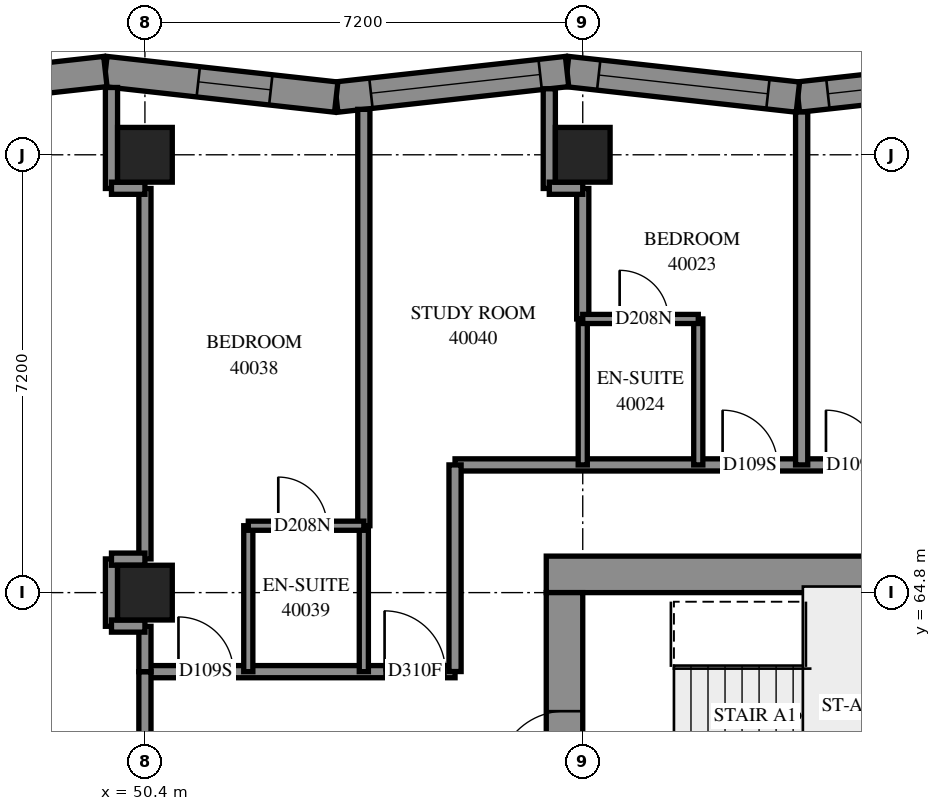
"""IFC4 building model, lengths in metres.
Left out: names, types, materials, properties, quantities, classifications, styles, units other than length and angle.
Written with IfcOpenShell. Run it as: python <this file> out.ifc"""

import sys

from ifc_helpers import new_model, si_unit, direction, frame, frame_2d, origin, origin_2d, place, context, subcontext, project, spatial, polyline, rectangle, outline, extrude, element, fill, save


model = new_model("IFC4")
c1 = context("Model", 3, precision=1e-05, world=origin(), true_north=direction((0.0, 1.0)))
c2 = subcontext(c1, "Body", "Model", "MODEL_VIEW")
j1 = project(units=[si_unit("LENGTHUNIT", "METRE"), si_unit("PLANEANGLEUNIT", "RADIAN")], contexts=[c1])
p1 = place(None, origin())
s1 = spatial("IfcSite", under=j1, at=p1, CompositionType="ELEMENT")
p2 = place(p1, origin())
s2 = spatial("IfcBuilding", under=s1, at=p2, CompositionType="ELEMENT")
p3 = place(p2, frame((0.0, 0.0, 149.0)))
s3 = spatial("IfcBuildingStorey", under=s2, at=p3, CompositionType="ELEMENT", Elevation=149.0)
for number, where, z_axis, x_axis in (
    (1, (50.4, 64.8, 0.0), (0.0, 0.0, 1.0), (1.0, 0.0, 0.0)),
    (2, (50.4, 72.0, 0.0), (0.0, 0.0, 1.0), (1.0, 0.0, 0.0)),
    (3, (57.6, 72.0, 0.0), (0.0, 0.0, 1.0), (1.0, 0.0, 0.0)),
):
    element("IfcColumn", number, at=place(p3, frame(where, z_axis=z_axis, x_axis=x_axis)), inside=s3, PredefinedType="COLUMN", context=c2, shape_type="SweptSolid", body=[
        extrude(rectangle(XDim=0.9, YDim=0.9, at=origin_2d()), origin(), (0.0, 0.0, 1.0), 3.1),
    ])
p4 = place(p3, frame((57.0, 65.1, -0.3), z_axis=(0.0, 0.0, 1.0), x_axis=(1.0, 0.0, 0.0)))
e4 = element("IfcWall", 4, at=p4, inside=s3, PredefinedType="SHEAR", context=c2, shape_type="SweptSolid", body=[
    extrude(rectangle(XDim=15.6, YDim=0.6, at=frame_2d((7.8, 0.0))), origin(), (0.0, 0.0, 1.0), 2.7),
])
p5 = place(p4, frame((10.6, 0.0, 0.3)))
e5 = element("IfcOpeningElement", 5, at=p5, cuts=e4, PredefinedType="OPENING", context=c2, shape_type="SweptSolid", body=[
    extrude(rectangle(XDim=0.8, YDim=2.1, at=frame_2d((0.4, 1.05))), frame((0.0, 0.31, 0.0), z_axis=(0.0, -1.0, 0.0), x_axis=(1.0, 0.0, 0.0)), (0.0, 0.0, 1.0), 0.62),
])
p6 = place(p3, frame((57.3, 50.4, -0.3), z_axis=(0.0, 0.0, 1.0), x_axis=(0.0, 1.0, 0.0)))
e6 = element("IfcWall", 6, at=p6, inside=s3, PredefinedType="SHEAR", context=c2, shape_type="SweptSolid", body=[
    extrude(rectangle(XDim=14.4, YDim=0.6, at=frame_2d((7.2, 0.0))), origin(), (0.0, 0.0, 1.0), 2.7),
])
p7 = place(p6, frame((4.55, 0.0, 0.3)))
e7 = element("IfcOpeningElement", 7, at=p7, cuts=e6, PredefinedType="OPENING", context=c2, shape_type="SweptSolid", body=[
    extrude(rectangle(XDim=1.1, YDim=2.1, at=frame_2d((0.55, 1.05))), frame((0.0, 0.31, 0.0), z_axis=(0.0, -1.0, 0.0), x_axis=(1.0, 0.0, 0.0)), (0.0, 0.0, 1.0), 0.62),
])
p8 = place(p6, frame((11.35, 0.0, 0.3)))
e8 = element("IfcOpeningElement", 8, at=p8, cuts=e6, PredefinedType="OPENING", context=c2, shape_type="SweptSolid", body=[
    extrude(rectangle(XDim=1.1, YDim=2.1, at=frame_2d((0.55, 1.05))), frame((0.0, 0.31, 0.0), z_axis=(0.0, -1.0, 0.0), x_axis=(1.0, 0.0, 0.0)), (0.0, 0.0, 1.0), 0.62),
])
p9 = place(p3, frame((64.935, 73.37, 0.0), z_axis=(0.0, 0.0, 1.0), x_axis=(-0.993907338, -0.1102188888, 0.0)))
e9 = element("IfcWall", 9, at=p9, inside=s3, PredefinedType="SOLIDWALL", context=c2, shape_type="SweptSolid", body=[
    extrude(outline(polyline([(-0.028, -0.25), (3.792, -0.25), (3.847, 0.25), (0.028, 0.25), (-0.028, -0.25)])), origin(), (0.0, 0.0, 1.0), 3.1),
])
p10 = place(p9, frame((0.524, 0.0, 0.45)))
e10 = element("IfcOpeningElement", 10, at=p10, cuts=e9, PredefinedType="OPENING", context=c2, shape_type="SweptSolid", body=[
    extrude(rectangle(XDim=2.8, YDim=2.5, at=frame_2d((1.4, 1.25))), frame((0.0, 0.26, 0.0), z_axis=(0.0, -1.0, 0.0), x_axis=(1.0, 0.0, 0.0)), (0.0, 0.0, 1.0), 0.52),
])
p11 = place(p3, frame((61.138, 72.948, 0.0), z_axis=(0.0, 0.0, 1.0), x_axis=(-0.99390702, 0.1102217568, 0.0)))
e11 = element("IfcWall", 11, at=p11, inside=s3, PredefinedType="SOLIDWALL", context=c2, shape_type="SweptSolid", body=[
    extrude(outline(polyline([(0.028, -0.25), (3.847, -0.25), (3.792, 0.25), (-0.028, 0.25), (0.028, -0.25)])), origin(), (0.0, 0.0, 1.0), 3.1),
])
p12 = place(p11, frame((0.496, 0.0, 0.45)))
e12 = element("IfcOpeningElement", 12, at=p12, cuts=e11, PredefinedType="OPENING", context=c2, shape_type="SweptSolid", body=[
    extrude(rectangle(XDim=2.8, YDim=2.5, at=frame_2d((1.4, 1.25))), frame((0.0, 0.26, 0.0), z_axis=(0.0, -1.0, 0.0), x_axis=(1.0, 0.0, 0.0)), (0.0, 0.0, 1.0), 0.52),
])
p13 = place(p3, frame((57.342, 73.37, 0.0), z_axis=(0.0, 0.0, 1.0), x_axis=(-0.99390702, -0.1102217568, 0.0)))
e13 = element("IfcWall", 13, at=p13, inside=s3, PredefinedType="SOLIDWALL", context=c2, shape_type="SweptSolid", body=[
    extrude(outline(polyline([(-0.028, -0.25), (3.792, -0.25), (3.847, 0.25), (0.028, 0.25), (-0.028, -0.25)])), origin(), (0.0, 0.0, 1.0), 3.1),
])
p14 = place(p13, frame((0.445, 0.0, 0.45)))
e14 = element("IfcOpeningElement", 14, at=p14, cuts=e13, PredefinedType="OPENING", context=c2, shape_type="SweptSolid", body=[
    extrude(rectangle(XDim=2.8, YDim=2.5, at=frame_2d((1.4, 1.25))), frame((0.0, 0.26, 0.0), z_axis=(0.0, -1.0, 0.0), x_axis=(1.0, 0.0, 0.0)), (0.0, 0.0, 1.0), 0.52),
])
p15 = place(p3, frame((53.546, 72.948, 0.0), z_axis=(0.0, 0.0, 1.0), x_axis=(-0.99390702, 0.1102217568, 0.0)))
e15 = element("IfcWall", 15, at=p15, inside=s3, PredefinedType="SOLIDWALL", context=c2, shape_type="SweptSolid", body=[
    extrude(outline(polyline([(0.028, -0.25), (3.847, -0.25), (3.792, 0.25), (-0.028, 0.25), (0.028, -0.25)])), origin(), (0.0, 0.0, 1.0), 3.1),
])
p16 = place(p15, frame((1.083, 0.0, 0.45)))
e16 = element("IfcOpeningElement", 16, at=p16, cuts=e15, PredefinedType="OPENING", context=c2, shape_type="SweptSolid", body=[
    extrude(rectangle(XDim=1.2, YDim=2.5, at=frame_2d((0.6, 1.25))), frame((0.0, 0.26, 0.0), z_axis=(0.0, -1.0, 0.0), x_axis=(1.0, 0.0, 0.0)), (0.0, 0.0, 1.0), 0.52),
])
p17 = place(p3, frame((49.749, 73.37, 0.0), z_axis=(0.0, 0.0, 1.0), x_axis=(-0.99390702, -0.1102217568, 0.0)))
e17 = element("IfcWall", 17, at=p17, inside=s3, PredefinedType="SOLIDWALL", context=c2, shape_type="SweptSolid", body=[
    extrude(outline(polyline([(-0.028, -0.25), (3.792, -0.25), (3.847, 0.25), (0.028, 0.25), (-0.028, -0.25)])), origin(), (0.0, 0.0, 1.0), 3.1),
])
p18 = place(p17, frame((0.998, 0.0, 0.45)))
e18 = element("IfcOpeningElement", 18, at=p18, cuts=e17, PredefinedType="OPENING", context=c2, shape_type="SweptSolid", body=[
    extrude(rectangle(XDim=1.2, YDim=2.5, at=frame_2d((0.6, 1.25))), frame((0.0, 0.26, 0.0), z_axis=(0.0, -1.0, 0.0), x_axis=(1.0, 0.0, 0.0)), (0.0, 0.0, 1.0), 0.52),
])
p19 = place(p3, frame((55.5, 66.9, 0.0), z_axis=(0.0, 0.0, 1.0), x_axis=(1.0, 0.0, 0.0)))
e19 = element("IfcWall", 19, at=p19, inside=s3, PredefinedType="PARTITIONING", context=c2, shape_type="SweptSolid", body=[
    extrude(rectangle(XDim=18.6, YDim=0.2, at=frame_2d((9.3, 0.0))), origin(), (0.0, 0.0, 1.0), 3.1),
])
p20 = place(p19, frame((4.4, 0.0, 0.0)))
e20 = element("IfcOpeningElement", 20, at=p20, cuts=e19, PredefinedType="OPENING", context=c2, shape_type="SweptSolid", body=[
    extrude(rectangle(XDim=0.9, YDim=2.1, at=frame_2d((0.45, 1.05))), frame((0.0, 0.11, 0.0), z_axis=(0.0, -1.0, 0.0), x_axis=(1.0, 0.0, 0.0)), (0.0, 0.0, 1.0), 0.22),
])
p21 = place(p19, frame((6.1, 0.0, 0.0)))
e21 = element("IfcOpeningElement", 21, at=p21, cuts=e19, PredefinedType="OPENING", context=c2, shape_type="SweptSolid", body=[
    extrude(rectangle(XDim=0.9, YDim=2.1, at=frame_2d((0.45, 1.05))), frame((0.0, 0.11, 0.0), z_axis=(0.0, -1.0, 0.0), x_axis=(1.0, 0.0, 0.0)), (0.0, 0.0, 1.0), 0.22),
])
p22 = place(p19, frame((11.65, 0.0, 0.0)))
e22 = element("IfcOpeningElement", 22, at=p22, cuts=e19, PredefinedType="OPENING", context=c2, shape_type="SweptSolid", body=[
    extrude(rectangle(XDim=0.9, YDim=2.1, at=frame_2d((0.45, 1.05))), frame((0.0, 0.11, 0.0), z_axis=(0.0, -1.0, 0.0), x_axis=(1.0, 0.0, 0.0)), (0.0, 0.0, 1.0), 0.22),
])
p23 = place(p19, frame((13.3, 0.0, 0.0)))
e23 = element("IfcOpeningElement", 23, at=p23, cuts=e19, PredefinedType="OPENING", context=c2, shape_type="SweptSolid", body=[
    extrude(rectangle(XDim=0.9, YDim=2.1, at=frame_2d((0.45, 1.05))), frame((0.0, 0.11, 0.0), z_axis=(0.0, -1.0, 0.0), x_axis=(1.0, 0.0, 0.0)), (0.0, 0.0, 1.0), 0.22),
])
p24 = place(p3, frame((54.0, 65.9, 0.0), z_axis=(0.0, 0.0, 1.0), x_axis=(0.0, 1.0, 0.0)))
e24 = element("IfcWall", 24, at=p24, inside=s3, PredefinedType="PARTITIONING", context=c2, shape_type="SweptSolid", body=[
    extrude(rectangle(XDim=6.847, YDim=0.2, at=frame_2d((3.424, 0.0))), origin(), (0.0, 0.0, 1.0), 3.1),
])
p25 = place(p3, frame((50.4, 65.354, 0.0), z_axis=(0.0, 0.0, 1.0), x_axis=(0.0, 1.0, 0.0)))
e25 = element("IfcWall", 25, at=p25, inside=s3, PredefinedType="PARTITIONING", context=c2, shape_type="SweptSolid", body=[
    extrude(rectangle(XDim=6.092, YDim=0.2, at=frame_2d((3.046, 0.0))), origin(), (0.0, 0.0, 1.0), 3.1),
])
p26 = place(p3, frame((61.2, 66.9, 0.0), z_axis=(0.0, 0.0, 1.0), x_axis=(0.0, 1.0, 0.0)))
e26 = element("IfcWall", 26, at=p26, inside=s3, PredefinedType="PARTITIONING", context=c2, shape_type="SweptSolid", body=[
    extrude(rectangle(XDim=5.804, YDim=0.2, at=frame_2d((2.902, 0.0))), origin(), (0.0, 0.0, 1.0), 3.1),
])
p27 = place(p3, frame((50.4, 63.5, 0.0), z_axis=(0.0, 0.0, 1.0), x_axis=(1.0, 0.0, 0.0)))
e27 = element("IfcWall", 27, at=p27, inside=s3, PredefinedType="PARTITIONING", context=c2, shape_type="SweptSolid", body=[
    extrude(rectangle(XDim=5.1, YDim=0.2, at=frame_2d((2.55, 0.0))), origin(), (0.0, 0.0, 1.0), 3.1),
])
p28 = place(p27, frame((0.552, 0.0, 0.0)))
e28 = element("IfcOpeningElement", 28, at=p28, cuts=e27, PredefinedType="OPENING", context=c2, shape_type="SweptSolid", body=[
    extrude(rectangle(XDim=0.9, YDim=2.1, at=frame_2d((0.45, 1.05))), frame((0.0, 0.11, 0.0), z_axis=(0.0, -1.0, 0.0), x_axis=(1.0, 0.0, 0.0)), (0.0, 0.0, 1.0), 0.22),
])
p29 = place(p27, frame((3.941, 0.0, 0.0)))
e29 = element("IfcOpeningElement", 29, at=p29, cuts=e27, PredefinedType="OPENING", context=c2, shape_type="SweptSolid", body=[
    extrude(rectangle(XDim=1.0, YDim=2.1, at=frame_2d((0.5, 1.05))), frame((0.0, 0.11, 0.0), z_axis=(0.0, -1.0, 0.0), x_axis=(1.0, 0.0, 0.0)), (0.0, 0.0, 1.0), 0.22),
])
p30 = place(p3, frame((55.5, 63.502, 0.0), z_axis=(0.0, 0.0, 1.0), x_axis=(0.0, 1.0, 0.0)))
e30 = element("IfcWall", 30, at=p30, inside=s3, PredefinedType="PARTITIONING", context=c2, shape_type="SweptSolid", body=[
    extrude(rectangle(XDim=3.398, YDim=0.2, at=frame_2d((1.699, 0.0))), origin(), (0.0, 0.0, 1.0), 3.1),
])
for number, where, z_axis, x_axis in (
    (31, (52.1, 63.5, 0.0), (0.0, 0.0, 1.0), (0.0, 1.0, 0.0)),
    (32, (54.0, 63.5, 0.0), (0.0, 0.0, 1.0), (0.0, 1.0, 0.0)),
    (33, (59.5, 66.9, 0.0), (0.0, 0.0, 1.0), (0.0, 1.0, 0.0)),
    (34, (57.6, 66.9, 0.0), (0.0, 0.0, 1.0), (0.0, 1.0, 0.0)),
):
    element("IfcWall", number, at=place(p3, frame(where, z_axis=z_axis, x_axis=x_axis)), inside=s3, PredefinedType="PARTITIONING", context=c2, shape_type="SweptSolid", body=[
        extrude(rectangle(XDim=2.4, YDim=0.15, at=frame_2d((1.2, 0.0))), origin(), (0.0, 0.0, 1.0), 3.1),
    ])
p31 = place(p3, frame((57.6, 69.3, 0.0), z_axis=(0.0, 0.0, 1.0), x_axis=(0.0, 1.0, 0.0)))
e35 = element("IfcWall", 35, at=p31, inside=s3, PredefinedType="PARTITIONING", context=c2, shape_type="SweptSolid", body=[
    extrude(rectangle(XDim=2.146, YDim=0.2, at=frame_2d((1.073, 0.0))), origin(), (0.0, 0.0, 1.0), 3.1),
])
p32 = place(p3, frame((52.1, 65.9, 0.0), z_axis=(0.0, 0.0, 1.0), x_axis=(1.0, 0.0, 0.0)))
e36 = element("IfcWall", 36, at=p32, inside=s3, PredefinedType="PARTITIONING", context=c2, shape_type="SweptSolid", body=[
    extrude(rectangle(XDim=1.9, YDim=0.15, at=frame_2d((0.95, 0.0))), origin(), (0.0, 0.0, 1.0), 3.1),
])
p33 = place(p32, frame((0.493, 0.0, 0.0)))
e37 = element("IfcOpeningElement", 37, at=p33, cuts=e36, PredefinedType="OPENING", context=c2, shape_type="SweptSolid", body=[
    extrude(rectangle(XDim=0.8, YDim=2.1, at=frame_2d((0.4, 1.05))), frame((0.0, 0.085, 0.0), z_axis=(0.0, -1.0, 0.0), x_axis=(1.0, 0.0, 0.0)), (0.0, 0.0, 1.0), 0.17),
])
p34 = place(p3, frame((57.6, 69.3, 0.0), z_axis=(0.0, 0.0, 1.0), x_axis=(1.0, 0.0, 0.0)))
e38 = element("IfcWall", 38, at=p34, inside=s3, PredefinedType="PARTITIONING", context=c2, shape_type="SweptSolid", body=[
    extrude(rectangle(XDim=1.9, YDim=0.15, at=frame_2d((0.95, 0.0))), origin(), (0.0, 0.0, 1.0), 3.1),
])
p35 = place(p34, frame((0.607, 0.0, 0.0)))
e39 = element("IfcOpeningElement", 39, at=p35, cuts=e38, PredefinedType="OPENING", context=c2, shape_type="SweptSolid", body=[
    extrude(rectangle(XDim=0.8, YDim=2.1, at=frame_2d((0.4, 1.05))), frame((0.0, 0.085, 0.0), z_axis=(0.0, -1.0, 0.0), x_axis=(1.0, 0.0, 0.0)), (0.0, 0.0, 1.0), 0.17),
])
p36 = place(p3, frame((49.85, 71.446, 0.0), z_axis=(0.0, 0.0, 1.0), x_axis=(0.0, 1.0, 0.0)))
e40 = element("IfcWall", 40, at=p36, inside=s3, PredefinedType="PARTITIONING", context=c2, shape_type="SweptSolid", body=[
    extrude(rectangle(XDim=1.661, YDim=0.2, at=frame_2d((0.83, 0.0))), origin(), (0.0, 0.0, 1.0), 3.1),
])
p37 = place(p3, frame((57.05, 71.446, 0.0), z_axis=(0.0, 0.0, 1.0), x_axis=(0.0, 1.0, 0.0)))
e41 = element("IfcWall", 41, at=p37, inside=s3, PredefinedType="PARTITIONING", context=c2, shape_type="SweptSolid", body=[
    extrude(rectangle(XDim=1.639, YDim=0.2, at=frame_2d((0.82, 0.0))), origin(), (0.0, 0.0, 1.0), 3.1),
])
p38 = place(p3, frame((50.4, 62.302, 0.0), z_axis=(0.0, 0.0, 1.0), x_axis=(0.0, 1.0, 0.0)))
e42 = element("IfcWall", 42, at=p38, inside=s3, PredefinedType="PARTITIONING", context=c2, shape_type="SweptSolid", body=[
    extrude(rectangle(XDim=1.198, YDim=0.2, at=frame_2d((0.599, 0.0))), origin(), (0.0, 0.0, 1.0), 3.1),
])
p39 = place(p3, frame((49.85, 64.246, 0.0), z_axis=(0.0, 0.0, 1.0), x_axis=(0.0, 1.0, 0.0)))
e43 = element("IfcWall", 43, at=p39, inside=s3, PredefinedType="PARTITIONING", context=c2, shape_type="SweptSolid", body=[
    extrude(rectangle(XDim=1.108, YDim=0.2, at=frame_2d((0.554, 0.0))), origin(), (0.0, 0.0, 1.0), 3.1),
])
p40 = place(p3, frame((50.4, 63.5, 0.0), z_axis=(0.0, 0.0, 1.0), x_axis=(0.0, 1.0, 0.0)))
e44 = element("IfcWall", 44, at=p40, inside=s3, PredefinedType="PARTITIONING", context=c2, shape_type="SweptSolid", body=[
    extrude(rectangle(XDim=0.746, YDim=0.2, at=frame_2d((0.373, 0.0))), origin(), (0.0, 0.0, 1.0), 3.1),
])
for number, where, z_axis, x_axis in (
    (45, (57.05, 71.45, 0.0), (0.0, 0.0, 1.0), (1.0, 0.0, 0.0)),
    (46, (49.85, 71.45, 0.0), (0.0, 0.0, 1.0), (1.0, 0.0, 0.0)),
    (47, (49.85, 65.35, 0.0), (0.0, 0.0, 1.0), (1.0, 0.0, 0.0)),
    (48, (49.85, 64.25, 0.0), (0.0, 0.0, 1.0), (1.0, 0.0, 0.0)),
):
    element("IfcWall", number, at=place(p3, frame(where, z_axis=z_axis, x_axis=x_axis)), inside=s3, PredefinedType="PARTITIONING", context=c2, shape_type="SweptSolid", body=[
        extrude(rectangle(XDim=0.55, YDim=0.2, at=frame_2d((0.275, 0.0))), origin(), (0.0, 0.0, 1.0), 3.1),
    ])
p41 = place(p10, origin())
e49 = element("IfcWindow", 49, at=p41, inside=s3, PartitioningType="SINGLE_PANEL", PredefinedType="WINDOW", context=c2, shape_type="SweptSolid", body=[
    extrude(rectangle(XDim=2.8, YDim=2.5, at=frame_2d((1.4, 1.25))), frame((0.0, 0.18, 0.0), z_axis=(0.0, -1.0, 0.0), x_axis=(1.0, 0.0, 0.0)), (0.0, 0.0, 1.0), 0.06),
])
fill(e10, e49)
p42 = place(p12, origin())
e50 = element("IfcWindow", 50, at=p42, inside=s3, PartitioningType="SINGLE_PANEL", PredefinedType="WINDOW", context=c2, shape_type="SweptSolid", body=[
    extrude(rectangle(XDim=2.8, YDim=2.5, at=frame_2d((1.4, 1.25))), frame((0.0, 0.18, 0.0), z_axis=(0.0, -1.0, 0.0), x_axis=(1.0, 0.0, 0.0)), (0.0, 0.0, 1.0), 0.06),
])
fill(e12, e50)
p43 = place(p14, origin())
e51 = element("IfcWindow", 51, at=p43, inside=s3, PartitioningType="SINGLE_PANEL", PredefinedType="WINDOW", context=c2, shape_type="SweptSolid", body=[
    extrude(rectangle(XDim=2.8, YDim=2.5, at=frame_2d((1.4, 1.25))), frame((0.0, 0.18, 0.0), z_axis=(0.0, -1.0, 0.0), x_axis=(1.0, 0.0, 0.0)), (0.0, 0.0, 1.0), 0.06),
])
fill(e14, e51)
p44 = place(p16, origin())
e52 = element("IfcWindow", 52, at=p44, inside=s3, PartitioningType="SINGLE_PANEL", PredefinedType="WINDOW", context=c2, shape_type="SweptSolid", body=[
    extrude(rectangle(XDim=1.2, YDim=2.5, at=frame_2d((0.6, 1.25))), frame((0.0, 0.18, 0.0), z_axis=(0.0, -1.0, 0.0), x_axis=(1.0, 0.0, 0.0)), (0.0, 0.0, 1.0), 0.06),
])
fill(e16, e52)
p45 = place(p8, origin())
e53 = element("IfcDoor", 53, at=p45, inside=s3, OperationType="SINGLE_SWING_LEFT", PredefinedType="DOOR", context=c2, shape_type="SweptSolid", body=[
    extrude(rectangle(XDim=1.1, YDim=2.1, at=frame_2d((0.55, 1.05))), frame((0.0, 0.025, 0.0), z_axis=(0.0, -1.0, 0.0), x_axis=(1.0, 0.0, 0.0)), (0.0, 0.0, 1.0), 0.05),
])
fill(e8, e53)
p46 = place(p20, origin())
e54 = element("IfcDoor", 54, at=p46, inside=s3, OperationType="SINGLE_SWING_RIGHT", PredefinedType="DOOR", context=c2, shape_type="SweptSolid", body=[
    extrude(rectangle(XDim=0.9, YDim=2.1, at=frame_2d((0.45, 1.05))), frame((0.0, 0.025, 0.0), z_axis=(0.0, -1.0, 0.0), x_axis=(1.0, 0.0, 0.0)), (0.0, 0.0, 1.0), 0.05),
])
fill(e20, e54)
p47 = place(p35, origin())
e55 = element("IfcDoor", 55, at=p47, inside=s3, OperationType="SINGLE_SWING_RIGHT", PredefinedType="DOOR", context=c2, shape_type="SweptSolid", body=[
    extrude(rectangle(XDim=0.8, YDim=2.1, at=frame_2d((0.4, 1.05))), frame((0.0, 0.025, 0.0), z_axis=(0.0, -1.0, 0.0), x_axis=(1.0, 0.0, 0.0)), (0.0, 0.0, 1.0), 0.05),
])
fill(e39, e55)
p48 = place(p21, origin())
e56 = element("IfcDoor", 56, at=p48, inside=s3, OperationType="SINGLE_SWING_LEFT", PredefinedType="DOOR", context=c2, shape_type="SweptSolid", body=[
    extrude(rectangle(XDim=0.9, YDim=2.1, at=frame_2d((0.45, 1.05))), frame((0.0, 0.025, 0.0), z_axis=(0.0, -1.0, 0.0), x_axis=(1.0, 0.0, 0.0)), (0.0, 0.0, 1.0), 0.05),
])
fill(e21, e56)
p49 = place(p28, origin())
e57 = element("IfcDoor", 57, at=p49, inside=s3, OperationType="SINGLE_SWING_RIGHT", PredefinedType="DOOR", context=c2, shape_type="SweptSolid", body=[
    extrude(rectangle(XDim=0.9, YDim=2.1, at=frame_2d((0.45, 1.05))), frame((0.0, 0.025, 0.0), z_axis=(0.0, -1.0, 0.0), x_axis=(1.0, 0.0, 0.0)), (0.0, 0.0, 1.0), 0.05),
])
fill(e28, e57)
p50 = place(p33, origin())
e58 = element("IfcDoor", 58, at=p50, inside=s3, OperationType="SINGLE_SWING_RIGHT", PredefinedType="DOOR", context=c2, shape_type="SweptSolid", body=[
    extrude(rectangle(XDim=0.8, YDim=2.1, at=frame_2d((0.4, 1.05))), frame((0.0, 0.025, 0.0), z_axis=(0.0, -1.0, 0.0), x_axis=(1.0, 0.0, 0.0)), (0.0, 0.0, 1.0), 0.05),
])
fill(e37, e58)
p51 = place(p29, origin())
e59 = element("IfcDoor", 59, at=p51, inside=s3, OperationType="SINGLE_SWING_LEFT", PredefinedType="DOOR", context=c2, shape_type="SweptSolid", body=[
    extrude(rectangle(XDim=1.0, YDim=2.1, at=frame_2d((0.5, 1.05))), frame((0.0, 0.025, 0.0), z_axis=(0.0, -1.0, 0.0), x_axis=(1.0, 0.0, 0.0)), (0.0, 0.0, 1.0), 0.05),
])
fill(e29, e59)
save(model, sys.argv[1])
